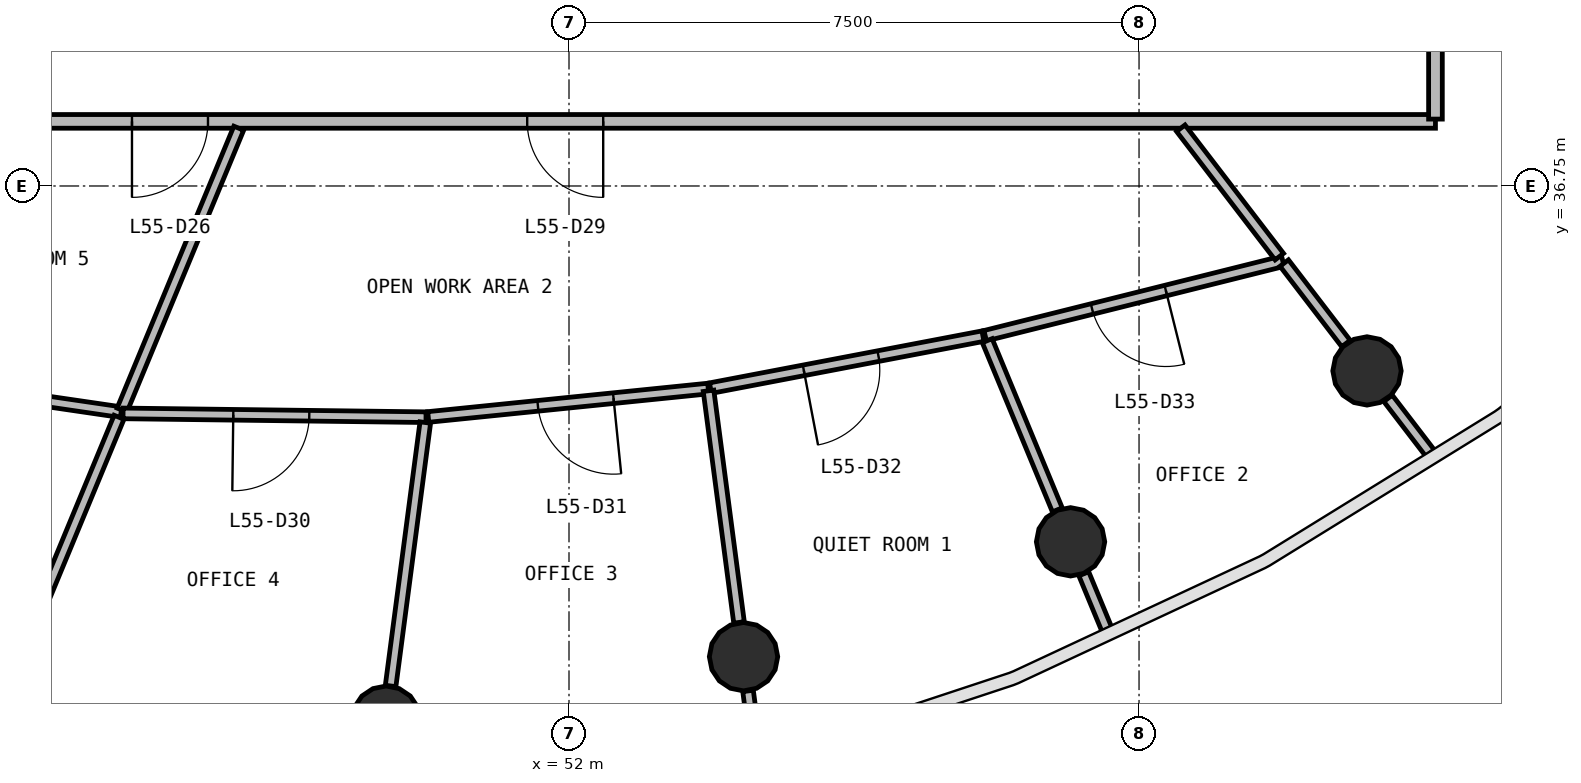
"""IFC4 building model, lengths in metres.
Left out: names, types, materials, properties, quantities, classifications, styles, units other than length and angle.
Written with IfcOpenShell. Run it as: python <this file> out.ifc"""

import sys

from ifc_helpers import new_model, si_unit, direction, frame, frame_2d, origin, origin_2d, place, context, subcontext, project, spatial, rectangle, circle, extrude, source, transform, mapped, element, fill, save


model = new_model("IFC4")
c1 = context("Model", 3, precision=1e-05, world=origin(), true_north=direction((0.0, 1.0)))
c2 = subcontext(c1, "Body", "Model", "MODEL_VIEW")
j1 = project(units=[si_unit("LENGTHUNIT", "METRE"), si_unit("PLANEANGLEUNIT", "RADIAN")], contexts=[c1])
p1 = place(None, origin())
s1 = spatial("IfcSite", under=j1, at=p1, CompositionType="ELEMENT")
p2 = place(p1, origin())
s2 = spatial("IfcBuilding", under=s1, at=p2, CompositionType="ELEMENT")
p3 = place(p2, frame((0.0, 0.0, 226.7)))
s3 = spatial("IfcBuildingStorey", under=s2, at=p3, CompositionType="ELEMENT", Elevation=226.7)
m1 = source(origin(), c2, "Body", "SweptSolid", [
    extrude(circle(Radius=0.45, at=origin_2d()), origin(), (0.0, 0.0, 1.0), 3.9),
])
for number, where, z_axis, x_axis in (
    (1, (49.594, 29.722, 0.0), (0.0, 0.0, 1.0), (1.0, 0.0, 0.0)),
    (2, (54.296, 30.558, 0.0), (0.0, 0.0, 1.0), (1.0, 0.0, 0.0)),
    (3, (58.599, 32.069, 0.0), (0.0, 0.0, 1.0), (1.0, 0.0, 0.0)),
    (4, (62.499, 34.317, 0.0), (0.0, 0.0, 1.0), (1.0, 0.0, 0.0)),
):
    element("IfcColumn", number, at=place(p3, frame(where, z_axis=z_axis, x_axis=x_axis)), inside=s3, PredefinedType="COLUMN", context=c2, shape_type="MappedRepresentation", body=[
        mapped(m1, transform((0.0, 0.0, 0.0), scale=1.0)),
    ])
p4 = place(p3, frame((63.4, 37.6, 0.0), z_axis=(0.0, 0.0, 1.0), x_axis=(-1.0, 0.0, 0.0)))
e5 = element("IfcWall", 5, at=p4, inside=s3, PredefinedType="PARTITIONING", context=c2, shape_type="SweptSolid", body=[
    extrude(rectangle(XDim=22.8, YDim=0.18, at=frame_2d((11.4, 0.0))), origin(), (0.0, 0.0, 1.0), 2.7),
])
p5 = place(p4, frame((16.15, 0.0, 0.0)))
e6 = element("IfcOpeningElement", 6, at=p5, cuts=e5, PredefinedType="OPENING", context=c2, shape_type="SweptSolid", body=[
    extrude(rectangle(XDim=1.0, YDim=2.1, at=frame_2d((0.5, 1.05))), frame((0.0, 0.1, 0.0), z_axis=(0.0, -1.0, 0.0), x_axis=(1.0, 0.0, 0.0)), (0.0, 0.0, 1.0), 0.2),
])
p6 = place(p4, frame((10.95, 0.0, 0.0)))
e7 = element("IfcOpeningElement", 7, at=p6, cuts=e5, PredefinedType="OPENING", context=c2, shape_type="SweptSolid", body=[
    extrude(rectangle(XDim=1.0, YDim=2.1, at=frame_2d((0.5, 1.05))), frame((0.0, 0.1, 0.0), z_axis=(0.0, -1.0, 0.0), x_axis=(1.0, 0.0, 0.0)), (0.0, 0.0, 1.0), 0.2),
])
p7 = place(p3, frame((63.4, 58.37, 0.0), z_axis=(0.0, 0.0, 1.0), x_axis=(0.0, -1.0, 0.0)))
e8 = element("IfcWall", 8, at=p7, inside=s3, PredefinedType="PARTITIONING", context=c2, shape_type="SweptSolid", body=[
    extrude(rectangle(XDim=20.74, YDim=0.18, at=frame_2d((10.37, 0.0))), origin(), (0.0, 0.0, 1.0), 2.7),
])
p8 = place(p7, frame((12.09, 0.0, 0.0)))
e9 = element("IfcOpeningElement", 9, at=p8, cuts=e8, PredefinedType="OPENING", context=c2, shape_type="SweptSolid", body=[
    extrude(rectangle(XDim=1.0, YDim=2.1, at=frame_2d((0.5, 1.05))), frame((0.0, 0.1, 0.0), z_axis=(0.0, -1.0, 0.0), x_axis=(1.0, 0.0, 0.0)), (0.0, 0.0, 1.0), 0.2),
])
p9 = place(p7, frame((9.89, 0.0, 0.0)))
e10 = element("IfcOpeningElement", 10, at=p9, cuts=e8, PredefinedType="OPENING", context=c2, shape_type="SweptSolid", body=[
    extrude(rectangle(XDim=1.0, YDim=2.1, at=frame_2d((0.5, 1.05))), frame((0.0, 0.1, 0.0), z_axis=(0.0, -1.0, 0.0), x_axis=(1.0, 0.0, 0.0)), (0.0, 0.0, 1.0), 0.2),
])
p10 = place(p7, frame((4.29, 0.0, 0.0)))
e11 = element("IfcOpeningElement", 11, at=p10, cuts=e8, PredefinedType="OPENING", context=c2, shape_type="SweptSolid", body=[
    extrude(rectangle(XDim=1.0, YDim=2.1, at=frame_2d((0.5, 1.05))), frame((0.0, 0.1, 0.0), z_axis=(0.0, -1.0, 0.0), x_axis=(1.0, 0.0, 0.0)), (0.0, 0.0, 1.0), 0.2),
])
p11 = place(p3, frame((46.107, 33.774, 0.0), z_axis=(0.0, 0.0, 1.0), x_axis=(-0.989422644007, 0.145061474991, 0.0)))
e12 = element("IfcWall", 12, at=p11, inside=s3, PredefinedType="PARTITIONING", context=c2, shape_type="SweptSolid", body=[
    extrude(rectangle(XDim=4.534, YDim=0.14, at=frame_2d((2.267, 0.0))), origin(), (0.0, 0.0, 1.0), 2.7),
])
p12 = place(p11, frame((1.684, 0.0, 0.0)))
e13 = element("IfcOpeningElement", 13, at=p12, cuts=e12, PredefinedType="OPENING", context=c2, shape_type="SweptSolid", body=[
    extrude(rectangle(XDim=1.0, YDim=2.1, at=frame_2d((0.5, 1.05))), frame((0.0, 0.08, 0.0), z_axis=(0.0, -1.0, 0.0), x_axis=(1.0, 0.0, 0.0)), (0.0, 0.0, 1.0), 0.16),
])
p13 = place(p3, frame((47.655, 37.51, 0.0), z_axis=(0.0, 0.0, 1.0), x_axis=(-0.382636499574, -0.923898971313, 0.0)))
e14 = element("IfcWall", 14, at=p13, inside=s3, PredefinedType="PARTITIONING", context=c2, shape_type="SweptSolid", body=[
    extrude(rectangle(XDim=4.014, YDim=0.14, at=frame_2d((2.007, 0.0))), origin(), (0.0, 0.0, 1.0), 2.7),
])
p14 = place(p3, frame((61.392, 35.76, 0.0), z_axis=(0.0, 0.0, 1.0), x_axis=(-0.970103355672, -0.242692149262, 0.0)))
e15 = element("IfcWall", 15, at=p14, inside=s3, PredefinedType="PARTITIONING", context=c2, shape_type="SweptSolid", body=[
    extrude(rectangle(XDim=4.037, YDim=0.14, at=frame_2d((2.019, 0.0))), origin(), (0.0, 0.0, 1.0), 2.7),
])
p15 = place(p14, frame((1.587, 0.0, 0.0)))
e16 = element("IfcOpeningElement", 16, at=p15, cuts=e15, PredefinedType="OPENING", context=c2, shape_type="SweptSolid", body=[
    extrude(rectangle(XDim=1.0, YDim=2.1, at=frame_2d((0.5, 1.05))), frame((0.0, 0.08, 0.0), z_axis=(0.0, -1.0, 0.0), x_axis=(1.0, 0.0, 0.0)), (0.0, 0.0, 1.0), 0.16),
])
p16 = place(p3, frame((50.118, 33.708, 0.0), z_axis=(0.0, 0.0, 1.0), x_axis=(-0.999921931992, 0.012495195965, 0.0)))
e17 = element("IfcWall", 17, at=p16, inside=s3, PredefinedType="PARTITIONING", context=c2, shape_type="SweptSolid", body=[
    extrude(rectangle(XDim=3.986, YDim=0.14, at=frame_2d((1.993, 0.0))), origin(), (0.0, 0.0, 1.0), 2.7),
])
p17 = place(p16, frame((1.536, 0.0, 0.0)))
e18 = element("IfcOpeningElement", 18, at=p17, cuts=e17, PredefinedType="OPENING", context=c2, shape_type="SweptSolid", body=[
    extrude(rectangle(XDim=1.0, YDim=2.1, at=frame_2d((0.5, 1.05))), frame((0.0, 0.08, 0.0), z_axis=(0.0, -1.0, 0.0), x_axis=(1.0, 0.0, 0.0)), (0.0, 0.0, 1.0), 0.16),
])
p18 = place(p3, frame((46.08, 33.707, 0.0), z_axis=(0.0, 0.0, 1.0), x_axis=(-0.382686051964, -0.923878447434, 0.0)))
e19 = element("IfcWall", 19, at=p18, inside=s3, PredefinedType="PARTITIONING", context=c2, shape_type="SweptSolid", body=[
    extrude(rectangle(XDim=3.784, YDim=0.14, at=frame_2d((1.892, 0.0))), origin(), (0.0, 0.0, 1.0), 2.7),
])
p19 = place(p3, frame((53.832, 34.085, 0.0), z_axis=(0.0, 0.0, 1.0), x_axis=(-0.994884574055, -0.101018237503, 0.0)))
e20 = element("IfcWall", 20, at=p19, inside=s3, PredefinedType="PARTITIONING", context=c2, shape_type="SweptSolid", body=[
    extrude(rectangle(XDim=3.703, YDim=0.14, at=frame_2d((1.851, 0.0))), origin(), (0.0, 0.0, 1.0), 2.7),
])
p20 = place(p19, frame((1.253, 0.0, 0.0)))
e21 = element("IfcOpeningElement", 21, at=p20, cuts=e20, PredefinedType="OPENING", context=c2, shape_type="SweptSolid", body=[
    extrude(rectangle(XDim=1.0, YDim=2.1, at=frame_2d((0.5, 1.05))), frame((0.0, 0.08, 0.0), z_axis=(0.0, -1.0, 0.0), x_axis=(1.0, 0.0, 0.0)), (0.0, 0.0, 1.0), 0.16),
])
p21 = place(p3, frame((57.446, 34.775, 0.0), z_axis=(0.0, 0.0, 1.0), x_axis=(-0.982288762834, -0.18737338768, 0.0)))
e22 = element("IfcWall", 22, at=p21, inside=s3, PredefinedType="PARTITIONING", context=c2, shape_type="SweptSolid", body=[
    extrude(rectangle(XDim=3.65, YDim=0.14, at=frame_2d((1.825, 0.0))), origin(), (0.0, 0.0, 1.0), 2.7),
])
p22 = place(p21, frame((1.4, 0.0, 0.0)))
e23 = element("IfcOpeningElement", 23, at=p22, cuts=e22, PredefinedType="OPENING", context=c2, shape_type="SweptSolid", body=[
    extrude(rectangle(XDim=1.0, YDim=2.1, at=frame_2d((0.5, 1.05))), frame((0.0, 0.08, 0.0), z_axis=(0.0, -1.0, 0.0), x_axis=(1.0, 0.0, 0.0)), (0.0, 0.0, 1.0), 0.16),
])
p23 = place(p3, frame((50.109, 33.638, 0.0), z_axis=(0.0, 0.0, 1.0), x_axis=(-0.130599038576, -0.991435268247, 0.0)))
e24 = element("IfcWall", 24, at=p23, inside=s3, PredefinedType="PARTITIONING", context=c2, shape_type="SweptSolid", body=[
    extrude(rectangle(XDim=3.496, YDim=0.14, at=frame_2d((1.748, 0.0))), origin(), (0.0, 0.0, 1.0), 2.7),
])
p24 = place(p3, frame((53.836, 34.055, 0.0), z_axis=(0.0, 0.0, 1.0), x_axis=(0.130581901297, -0.991437525542, 0.0)))
e25 = element("IfcWall", 25, at=p24, inside=s3, PredefinedType="PARTITIONING", context=c2, shape_type="SweptSolid", body=[
    extrude(rectangle(XDim=3.074, YDim=0.14, at=frame_2d((1.537, 0.0))), origin(), (0.0, 0.0, 1.0), 2.7),
])
p25 = place(p3, frame((57.503, 34.715, 0.0), z_axis=(0.0, 0.0, 1.0), x_axis=(0.382736621099, -0.923857499222, 0.0)))
e26 = element("IfcWall", 26, at=p25, inside=s3, PredefinedType="PARTITIONING", context=c2, shape_type="SweptSolid", body=[
    extrude(rectangle(XDim=2.409, YDim=0.14, at=frame_2d((1.205, 0.0))), origin(), (0.0, 0.0, 1.0), 2.7),
])
p26 = place(p3, frame((60.049, 37.51, 0.0), z_axis=(0.0, 0.0, 1.0), x_axis=(0.608713079652, -0.793390437717, 0.0)))
e27 = element("IfcWall", 27, at=p26, inside=s3, PredefinedType="PARTITIONING", context=c2, shape_type="SweptSolid", body=[
    extrude(rectangle(XDim=2.13, YDim=0.14, at=frame_2d((1.065, 0.0))), origin(), (0.0, 0.0, 1.0), 2.7),
])
p27 = place(p3, frame((61.41, 35.736, 0.0), z_axis=(0.0, 0.0, 1.0), x_axis=(0.608746478316, -0.793364812137, 0.0)))
e28 = element("IfcWall", 28, at=p27, inside=s3, PredefinedType="PARTITIONING", context=c2, shape_type="SweptSolid", body=[
    extrude(rectangle(XDim=1.334, YDim=0.14, at=frame_2d((0.667, 0.0))), origin(), (0.0, 0.0, 1.0), 2.7),
])
p28 = place(p3, frame((62.776, 33.956, 0.0), z_axis=(0.0, 0.0, 1.0), x_axis=(0.608826656725, -0.793303285044, 0.0)))
e29 = element("IfcWall", 29, at=p28, inside=s3, PredefinedType="PARTITIONING", context=c2, shape_type="SweptSolid", body=[
    extrude(rectangle(XDim=0.908, YDim=0.14, at=frame_2d((0.454, 0.0))), origin(), (0.0, 0.0, 1.0), 2.7),
])
p29 = place(p3, frame((54.356, 30.107, 0.0), z_axis=(0.0, 0.0, 1.0), x_axis=(0.130469380283, -0.991452339151, 0.0)))
e30 = element("IfcWall", 30, at=p29, inside=s3, PredefinedType="PARTITIONING", context=c2, shape_type="SweptSolid", body=[
    extrude(rectangle(XDim=0.85, YDim=0.14, at=frame_2d((0.425, 0.0))), origin(), (0.0, 0.0, 1.0), 2.7),
])
p30 = place(p3, frame((58.773, 31.648, 0.0), z_axis=(0.0, 0.0, 1.0), x_axis=(0.382631826792, -0.923900906551, 0.0)))
e31 = element("IfcWall", 31, at=p30, inside=s3, PredefinedType="PARTITIONING", context=c2, shape_type="SweptSolid", body=[
    extrude(rectangle(XDim=0.796, YDim=0.14, at=frame_2d((0.398, 0.0))), origin(), (0.0, 0.0, 1.0), 2.7),
])
m2 = source(origin(), c2, "Body", "SweptSolid", [
    extrude(rectangle(XDim=1.0, YDim=2.1, at=frame_2d((0.5, 1.05))), frame((0.0, 0.025, 0.0), z_axis=(0.0, -1.0, 0.0), x_axis=(1.0, 0.0, 0.0)), (0.0, 0.0, 1.0), 0.05),
])
p31 = place(p5, origin())
e32 = element("IfcDoor", 32, at=p31, inside=s3, OperationType="SINGLE_SWING_RIGHT", PredefinedType="DOOR", context=c2, shape_type="MappedRepresentation", body=[
    mapped(m2, transform((0.0, 0.0, 0.0), scale=1.0)),
])
fill(e6, e32)
p32 = place(p6, origin())
e33 = element("IfcDoor", 33, at=p32, inside=s3, OperationType="SINGLE_SWING_LEFT", PredefinedType="DOOR", context=c2, shape_type="MappedRepresentation", body=[
    mapped(m2, transform((0.0, 0.0, 0.0), scale=1.0)),
])
fill(e7, e33)
p33 = place(p17, origin())
e34 = element("IfcDoor", 34, at=p33, inside=s3, OperationType="SINGLE_SWING_RIGHT", PredefinedType="DOOR", context=c2, shape_type="MappedRepresentation", body=[
    mapped(m2, transform((0.0, 0.0, 0.0), scale=1.0)),
])
fill(e18, e34)
p34 = place(p20, origin())
e35 = element("IfcDoor", 35, at=p34, inside=s3, OperationType="SINGLE_SWING_LEFT", PredefinedType="DOOR", context=c2, shape_type="MappedRepresentation", body=[
    mapped(m2, transform((0.0, 0.0, 0.0), scale=1.0)),
])
fill(e21, e35)
p35 = place(p22, origin())
e36 = element("IfcDoor", 36, at=p35, inside=s3, OperationType="SINGLE_SWING_RIGHT", PredefinedType="DOOR", context=c2, shape_type="MappedRepresentation", body=[
    mapped(m2, transform((0.0, 0.0, 0.0), scale=1.0)),
])
fill(e23, e36)
p36 = place(p15, origin())
e37 = element("IfcDoor", 37, at=p36, inside=s3, OperationType="SINGLE_SWING_LEFT", PredefinedType="DOOR", context=c2, shape_type="MappedRepresentation", body=[
    mapped(m2, transform((0.0, 0.0, 0.0), scale=1.0)),
])
fill(e16, e37)
save(model, sys.argv[1])
